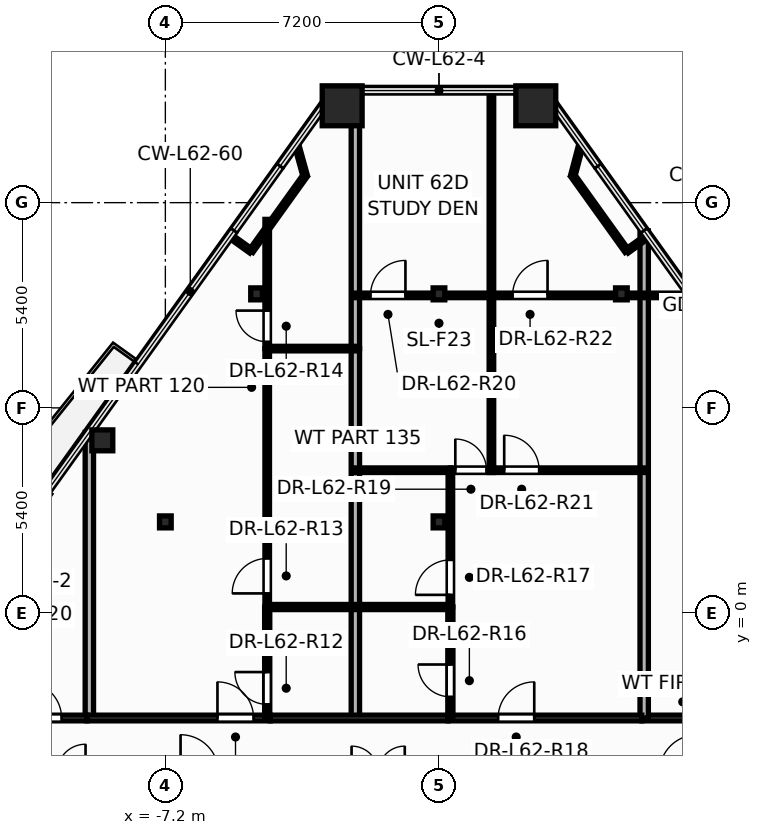
"""IFC4 building model, lengths in metres.
Left out: names, types, materials, properties, quantities, classifications, styles, units other than length and angle.
Written with IfcOpenShell. Run it as: python <this file> out.ifc"""

import sys

from ifc_helpers import new_model, si_unit, direction, frame, frame_2d, origin, origin_2d, place, context, subcontext, project, spatial, rectangle, hollow_rectangle, hollow_circle, i_section, extrude, element, fill, save


model = new_model("IFC4")
c1 = context("Model", 3, precision=1e-05, world=origin(), true_north=direction((0.0, 1.0)))
c2 = subcontext(c1, "Body", "Model", "MODEL_VIEW")
j1 = project(units=[si_unit("LENGTHUNIT", "METRE"), si_unit("PLANEANGLEUNIT", "RADIAN")], contexts=[c1])
p1 = place(None, origin())
s1 = spatial("IfcSite", under=j1, at=p1, CompositionType="ELEMENT")
p2 = place(p1, origin())
s2 = spatial("IfcBuilding", under=s1, at=p2, CompositionType="ELEMENT")
p3 = place(p2, frame((0.0, 0.0, 237.0)))
s3 = spatial("IfcBuildingStorey", under=s2, at=p3, CompositionType="ELEMENT", Elevation=237.0)
for number, where, z_axis, x_axis in (
    (1, (2.548, 13.349, 0.0), (0.0, 0.0, 1.0), (1.0, 0.0, 0.0)),
    (2, (-2.548, 13.349, 0.0), (0.0, 0.0, 1.0), (1.0, 0.0, 0.0)),
):
    element("IfcColumn", number, at=place(p3, frame(where, z_axis=z_axis, x_axis=x_axis)), inside=s3, PredefinedType="COLUMN", context=c2, shape_type="SweptSolid", body=[
        extrude(hollow_rectangle(XDim=1.05, YDim=1.05, WallThickness=0.045, at=origin_2d()), origin(), (0.0, 0.0, 1.0), 3.6),
    ])
p4 = place(p3, frame((-8.858, 4.546, 0.0), z_axis=(0.0, 0.0, 1.0), x_axis=(1.0, 0.0, 0.0)))
e3 = element("IfcColumn", 3, at=p4, inside=s3, PredefinedType="COLUMN", context=c2, shape_type="SweptSolid", body=[
    extrude(hollow_circle(Radius=0.275, WallThickness=0.024, at=origin_2d()), origin(), (0.0, 0.0, 1.0), 3.6),
])
for number, where, z_axis, x_axis in (
    (4, (-7.2, 2.4, 0.0), (0.0, 0.0, 1.0), (1.0, 0.0, 0.0)),
    (5, (0.0, 2.4, 0.0), (0.0, 0.0, 1.0), (1.0, 0.0, 0.0)),
    (6, (-4.8, 8.4, 0.0), (0.0, 0.0, 1.0), (1.0, 0.0, 0.0)),
    (7, (0.0, 8.4, 0.0), (0.0, 0.0, 1.0), (1.0, 0.0, 0.0)),
    (8, (4.8, 8.4, 0.0), (0.0, 0.0, 1.0), (1.0, 0.0, 0.0)),
):
    element("IfcColumn", number, at=place(p3, frame(where, z_axis=z_axis, x_axis=x_axis)), inside=s3, PredefinedType="COLUMN", context=c2, shape_type="SweptSolid", body=[
        extrude(i_section(OverallWidth=0.307, OverallDepth=0.314, WebThickness=0.012, FlangeThickness=0.019, at=origin_2d()), origin(), (0.0, 0.0, 1.0), 3.6),
    ])
p5 = place(p3, frame((-9.2, -2.76, 0.0), z_axis=(0.0, 0.0, 1.0), x_axis=(0.0, 1.0, 0.0)))
e9 = element("IfcWall", 9, at=p5, inside=s3, PredefinedType="PARTITIONING", context=c2, shape_type="SweptSolid", body=[
    extrude(rectangle(XDim=7.516, YDim=0.22, at=frame_2d((3.758, 0.0))), origin(), (0.0, 0.0, 1.0), 2.62),
])
p6 = place(p3, frame((5.34, -2.76, 0.0), z_axis=(0.0, 0.0, 1.0), x_axis=(1.0, 0.0, 0.0)))
e10 = element("IfcWall", 10, at=p6, inside=s3, PredefinedType="PARTITIONING", context=c2, shape_type="SweptSolid", body=[
    extrude(rectangle(XDim=7.16, YDim=0.15, at=frame_2d((3.58, 0.0))), origin(), (0.0, 0.0, 1.0), 2.32),
])
p7 = place(p6, frame((3.423, 0.0, 0.0)))
e11 = element("IfcOpeningElement", 11, at=p7, cuts=e10, PredefinedType="OPENING", context=c2, shape_type="SweptSolid", body=[
    extrude(rectangle(XDim=0.956, YDim=2.104, at=frame_2d((0.475, 1.052))), frame((0.0, 0.085, 0.0), z_axis=(0.0, -1.0, 0.0), x_axis=(1.0, 0.0, 0.0)), (0.0, 0.0, 1.0), 0.17),
])
p8 = place(p3, frame((-4.52, 0.16, 0.0), z_axis=(0.0, 0.0, 1.0), x_axis=(0.0, 1.0, 0.0)))
e12 = element("IfcWall", 12, at=p8, inside=s3, PredefinedType="PARTITIONING", context=c2, shape_type="SweptSolid", body=[
    extrude(rectangle(XDim=6.8, YDim=0.12, at=frame_2d((3.4, 0.0))), origin(), (0.0, 0.0, 1.0), 2.32),
])
p9 = place(p8, frame((0.358, 0.0, 0.0)))
e13 = element("IfcOpeningElement", 13, at=p9, cuts=e12, PredefinedType="OPENING", context=c2, shape_type="SweptSolid", body=[
    extrude(rectangle(XDim=0.926, YDim=2.104, at=frame_2d((0.46, 1.052))), frame((0.0, 0.07, 0.0), z_axis=(0.0, -1.0, 0.0), x_axis=(1.0, 0.0, 0.0)), (0.0, 0.0, 1.0), 0.14),
])
p10 = place(p3, frame((5.4, -2.76, 0.0), z_axis=(0.0, 0.0, 1.0), x_axis=(0.0, 1.0, 0.0)))
e14 = element("IfcWall", 14, at=p10, inside=s3, PredefinedType="PARTITIONING", context=c2, shape_type="SweptSolid", body=[
    extrude(rectangle(XDim=12.816, YDim=0.22, at=frame_2d((6.408, 0.0))), origin(), (0.0, 0.0, 1.0), 2.32),
])
p11 = place(p3, frame((-2.2, 6.96, 0.0), z_axis=(0.0, 0.0, 1.0), x_axis=(0.0, 1.0, 0.0)))
e15 = element("IfcWall", 15, at=p11, inside=s3, PredefinedType="PARTITIONING", context=c2, shape_type="SweptSolid", body=[
    extrude(rectangle(XDim=6.789, YDim=0.22, at=frame_2d((3.394, 0.0))), origin(), (0.0, 0.0, 1.0), 2.62),
])
p12 = place(p3, frame((1.38, 3.76, 0.0), z_axis=(0.0, 0.0, 1.0), x_axis=(0.0, 1.0, 0.0)))
e16 = element("IfcWall", 16, at=p12, inside=s3, PredefinedType="PARTITIONING", context=c2, shape_type="SweptSolid", body=[
    extrude(rectangle(XDim=9.989, YDim=0.12, at=frame_2d((4.994, 0.0))), origin(), (0.0, 0.0, 1.0), 2.62),
])
p13 = place(p3, frame((1.38, 8.36, 0.0), z_axis=(0.0, 0.0, 1.0), x_axis=(1.0, 0.0, 0.0)))
e17 = element("IfcWall", 17, at=p13, inside=s3, PredefinedType="PARTITIONING", context=c2, shape_type="SweptSolid", body=[
    extrude(rectangle(XDim=5.236, YDim=0.12, at=frame_2d((2.618, 0.0))), origin(), (0.0, 0.0, 1.0), 2.62),
])
p14 = place(p13, frame((0.557, 0.0, 0.0)))
e18 = element("IfcOpeningElement", 18, at=p14, cuts=e17, PredefinedType="OPENING", context=c2, shape_type="SweptSolid", body=[
    extrude(rectangle(XDim=0.926, YDim=2.104, at=frame_2d((0.46, 1.052))), frame((0.0, 0.07, 0.0), z_axis=(0.0, -1.0, 0.0), x_axis=(1.0, 0.0, 0.0)), (0.0, 0.0, 1.0), 0.14),
])
p15 = place(p3, frame((0.24, -2.76, 0.0), z_axis=(0.0, 0.0, 1.0), x_axis=(1.0, 0.0, 0.0)))
e19 = element("IfcWall", 19, at=p15, inside=s3, PredefinedType="PARTITIONING", context=c2, shape_type="SweptSolid", body=[
    extrude(rectangle(XDim=5.098, YDim=0.15, at=frame_2d((2.549, 0.0))), origin(), (0.0, 0.0, 1.0), 2.964),
])
p16 = place(p15, frame((1.317, 0.0, 0.0)))
e20 = element("IfcOpeningElement", 20, at=p16, cuts=e19, PredefinedType="OPENING", context=c2, shape_type="SweptSolid", body=[
    extrude(rectangle(XDim=0.956, YDim=2.104, at=frame_2d((0.475, 1.052))), frame((0.0, 0.085, 0.0), z_axis=(0.0, -1.0, 0.0), x_axis=(1.0, 0.0, 0.0)), (0.0, 0.0, 1.0), 0.17),
])
p17 = place(p3, frame((-9.26, -2.76, 0.0), z_axis=(0.0, 0.0, 1.0), x_axis=(1.0, 0.0, 0.0)))
e21 = element("IfcWall", 21, at=p17, inside=s3, PredefinedType="PARTITIONING", context=c2, shape_type="SweptSolid", body=[
    extrude(rectangle(XDim=4.82, YDim=0.15, at=frame_2d((2.41, 0.0))), origin(), (0.0, 0.0, 1.0), 2.32),
])
p18 = place(p17, frame((3.431, 0.0, 0.0)))
e22 = element("IfcOpeningElement", 22, at=p18, cuts=e21, PredefinedType="OPENING", context=c2, shape_type="SweptSolid", body=[
    extrude(rectangle(XDim=0.956, YDim=2.104, at=frame_2d((0.475, 1.052))), frame((0.0, 0.085, 0.0), z_axis=(0.0, -1.0, 0.0), x_axis=(1.0, 0.0, 0.0)), (0.0, 0.0, 1.0), 0.17),
])
p19 = place(p3, frame((1.32, 3.76, 0.0), z_axis=(0.0, 0.0, 1.0), x_axis=(1.0, 0.0, 0.0)))
e23 = element("IfcWall", 23, at=p19, inside=s3, PredefinedType="PARTITIONING", context=c2, shape_type="SweptSolid", body=[
    extrude(rectangle(XDim=4.08, YDim=0.12, at=frame_2d((2.04, 0.0))), origin(), (0.0, 0.0, 1.0), 2.964),
])
p20 = place(p19, frame((0.396, 0.0, 0.0)))
e24 = element("IfcOpeningElement", 24, at=p20, cuts=e23, PredefinedType="OPENING", context=c2, shape_type="SweptSolid", body=[
    extrude(rectangle(XDim=0.926, YDim=2.104, at=frame_2d((0.46, 1.052))), frame((0.0, 0.07, 0.0), z_axis=(0.0, -1.0, 0.0), x_axis=(1.0, 0.0, 0.0)), (0.0, 0.0, 1.0), 0.14),
])
p21 = place(p3, frame((-2.2, -2.76, 0.0), z_axis=(0.0, 0.0, 1.0), x_axis=(0.0, 1.0, 0.0)))
e25 = element("IfcWall", 25, at=p21, inside=s3, PredefinedType="PARTITIONING", context=c2, shape_type="SweptSolid", body=[
    extrude(rectangle(XDim=9.72, YDim=0.22, at=frame_2d((4.86, 0.0))), origin(), (0.0, 0.0, 1.0), 2.32),
])
p22 = place(p3, frame((0.3, 0.16, 0.0), z_axis=(0.0, 0.0, 1.0), x_axis=(0.0, 1.0, 0.0)))
e26 = element("IfcWall", 26, at=p22, inside=s3, PredefinedType="PARTITIONING", context=c2, shape_type="SweptSolid", body=[
    extrude(rectangle(XDim=3.6, YDim=0.12, at=frame_2d((1.8, 0.0))), origin(), (0.0, 0.0, 1.0), 2.32),
])
p23 = place(p22, frame((0.32, 0.0, 0.0)))
e27 = element("IfcOpeningElement", 27, at=p23, cuts=e26, PredefinedType="OPENING", context=c2, shape_type="SweptSolid", body=[
    extrude(rectangle(XDim=0.926, YDim=2.104, at=frame_2d((0.46, 1.052))), frame((0.0, 0.07, 0.0), z_axis=(0.0, -1.0, 0.0), x_axis=(1.0, 0.0, 0.0)), (0.0, 0.0, 1.0), 0.14),
])
p24 = place(p3, frame((-2.2, 8.36, 0.0), z_axis=(0.0, 0.0, 1.0), x_axis=(1.0, 0.0, 0.0)))
e28 = element("IfcWall", 28, at=p24, inside=s3, PredefinedType="PARTITIONING", context=c2, shape_type="SweptSolid", body=[
    extrude(rectangle(XDim=3.58, YDim=0.12, at=frame_2d((1.79, 0.0))), origin(), (0.0, 0.0, 1.0), 2.32),
])
p25 = place(p24, frame((0.398, 0.0, 0.0)))
e29 = element("IfcOpeningElement", 29, at=p25, cuts=e28, PredefinedType="OPENING", context=c2, shape_type="SweptSolid", body=[
    extrude(rectangle(XDim=0.926, YDim=2.104, at=frame_2d((0.46, 1.052))), frame((0.0, 0.07, 0.0), z_axis=(0.0, -1.0, 0.0), x_axis=(1.0, 0.0, 0.0)), (0.0, 0.0, 1.0), 0.14),
])
p26 = place(p3, frame((-4.52, 6.96, 0.0), z_axis=(0.0, 0.0, 1.0), x_axis=(0.0, 1.0, 0.0)))
e30 = element("IfcWall", 30, at=p26, inside=s3, PredefinedType="PARTITIONING", context=c2, shape_type="SweptSolid", body=[
    extrude(rectangle(XDim=3.4, YDim=0.12, at=frame_2d((1.7, 0.0))), origin(), (0.0, 0.0, 1.0), 2.62),
])
p27 = place(p26, frame((0.18, 0.0, 0.0)))
e31 = element("IfcOpeningElement", 31, at=p27, cuts=e30, PredefinedType="OPENING", context=c2, shape_type="SweptSolid", body=[
    extrude(rectangle(XDim=0.826, YDim=2.104, at=frame_2d((0.41, 1.052))), frame((0.0, 0.07, 0.0), z_axis=(0.0, -1.0, 0.0), x_axis=(1.0, 0.0, 0.0)), (0.0, 0.0, 1.0), 0.14),
])
p28 = place(p3, frame((-12.5, -2.76, 0.0), z_axis=(0.0, 0.0, 1.0), x_axis=(1.0, 0.0, 0.0)))
e32 = element("IfcWall", 32, at=p28, inside=s3, PredefinedType="PARTITIONING", context=c2, shape_type="SweptSolid", body=[
    extrude(rectangle(XDim=3.238, YDim=0.15, at=frame_2d((1.619, 0.0))), origin(), (0.0, 0.0, 1.0), 3.345),
])
p29 = place(p28, frame((1.619, 0.0, 0.0)))
e33 = element("IfcOpeningElement", 33, at=p29, cuts=e32, PredefinedType="OPENING", context=c2, shape_type="SweptSolid", body=[
    extrude(rectangle(XDim=0.956, YDim=2.104, at=frame_2d((0.475, 1.052))), frame((0.0, 0.085, 0.0), z_axis=(0.0, -1.0, 0.0), x_axis=(1.0, 0.0, 0.0)), (0.0, 0.0, 1.0), 0.17),
])
p30 = place(p3, frame((-4.52, -2.76, 0.0), z_axis=(0.0, 0.0, 1.0), x_axis=(0.0, 1.0, 0.0)))
e34 = element("IfcWall", 34, at=p30, inside=s3, PredefinedType="PARTITIONING", context=c2, shape_type="SweptSolid", body=[
    extrude(rectangle(XDim=2.92, YDim=0.135, at=frame_2d((1.46, 0.0))), origin(), (0.0, 0.0, 1.0), 3.345),
])
p31 = place(p30, frame((0.359, 0.0, 0.0)))
e35 = element("IfcOpeningElement", 35, at=p31, cuts=e34, PredefinedType="OPENING", context=c2, shape_type="SweptSolid", body=[
    extrude(rectangle(XDim=0.856, YDim=2.104, at=frame_2d((0.425, 1.052))), frame((0.0, 0.078, 0.0), z_axis=(0.0, -1.0, 0.0), x_axis=(1.0, 0.0, 0.0)), (0.0, 0.0, 1.0), 0.155),
])
p32 = place(p3, frame((0.3, -2.76, 0.0), z_axis=(0.0, 0.0, 1.0), x_axis=(0.0, 1.0, 0.0)))
e36 = element("IfcWall", 36, at=p32, inside=s3, PredefinedType="PARTITIONING", context=c2, shape_type="SweptSolid", body=[
    extrude(rectangle(XDim=2.92, YDim=0.135, at=frame_2d((1.46, 0.0))), origin(), (0.0, 0.0, 1.0), 2.32),
])
p33 = place(p32, frame((0.558, 0.0, 0.0)))
e37 = element("IfcOpeningElement", 37, at=p33, cuts=e36, PredefinedType="OPENING", context=c2, shape_type="SweptSolid", body=[
    extrude(rectangle(XDim=0.856, YDim=2.104, at=frame_2d((0.425, 1.052))), frame((0.0, 0.078, 0.0), z_axis=(0.0, -1.0, 0.0), x_axis=(1.0, 0.0, 0.0)), (0.0, 0.0, 1.0), 0.155),
])
p34 = place(p3, frame((-4.438, -2.76, 0.0), z_axis=(0.0, 0.0, 1.0), x_axis=(1.0, 0.0, 0.0)))
e38 = element("IfcWall", 38, at=p34, inside=s3, PredefinedType="PARTITIONING", context=c2, shape_type="SweptSolid", body=[
    extrude(rectangle(XDim=4.676, YDim=0.15, at=frame_2d((2.338, 0.0))), origin(), (0.0, 0.0, 1.0), 2.32),
])
p35 = place(p3, frame((-4.52, 0.16, 0.0), z_axis=(0.0, 0.0, 1.0), x_axis=(1.0, 0.0, 0.0)))
e39 = element("IfcWall", 39, at=p35, inside=s3, PredefinedType="PARTITIONING", context=c2, shape_type="SweptSolid", body=[
    extrude(rectangle(XDim=4.82, YDim=0.135, at=frame_2d((2.41, 0.0))), origin(), (0.0, 0.0, 1.0), 2.32),
])
p36 = place(p3, frame((-2.2, 3.76, 0.0), z_axis=(0.0, 0.0, 1.0), x_axis=(1.0, 0.0, 0.0)))
e40 = element("IfcWall", 40, at=p36, inside=s3, PredefinedType="PARTITIONING", context=c2, shape_type="SweptSolid", body=[
    extrude(rectangle(XDim=2.5, YDim=0.12, at=frame_2d((1.25, 0.0))), origin(), (0.0, 0.0, 1.0), 2.32),
])
for number, where, z_axis, x_axis in (
    (41, (-3.522, 11.509, 0.0), (0.0, 0.0, 1.0), (-0.583, -0.813, 0.0)),
    (42, (4.945, 9.525, 0.0), (0.0, 0.0, 1.0), (-0.583, 0.813, 0.0)),
):
    element("IfcWall", number, at=place(p3, frame(where, z_axis=z_axis, x_axis=x_axis)), inside=s3, PredefinedType="PARTITIONING", context=c2, shape_type="SweptSolid", body=[
        extrude(rectangle(XDim=2.441, YDim=0.12, at=frame_2d((1.221, 0.0))), origin(), (0.0, 0.0, 1.0), 2.62),
    ])
p37 = place(p3, frame((-4.52, 6.96, 0.0), z_axis=(0.0, 0.0, 1.0), x_axis=(1.0, 0.0, 0.0)))
e43 = element("IfcWall", 43, at=p37, inside=s3, PredefinedType="PARTITIONING", context=c2, shape_type="SweptSolid", body=[
    extrude(rectangle(XDim=2.32, YDim=0.12, at=frame_2d((1.16, 0.0))), origin(), (0.0, 0.0, 1.0), 2.964),
])
p38 = place(p3, frame((0.3, 3.76, 0.0), z_axis=(0.0, 0.0, 1.0), x_axis=(1.0, 0.0, 0.0)))
e44 = element("IfcWall", 44, at=p38, inside=s3, PredefinedType="PARTITIONING", context=c2, shape_type="SweptSolid", body=[
    extrude(rectangle(XDim=1.14, YDim=0.12, at=frame_2d((0.57, 0.0))), origin(), (0.0, 0.0, 1.0), 3.345),
])
p39 = place(p38, frame((0.13, 0.0, 0.0)))
e45 = element("IfcOpeningElement", 45, at=p39, cuts=e44, PredefinedType="OPENING", context=c2, shape_type="SweptSolid", body=[
    extrude(rectangle(XDim=0.826, YDim=2.104, at=frame_2d((0.41, 1.052))), frame((0.0, 0.07, 0.0), z_axis=(0.0, -1.0, 0.0), x_axis=(1.0, 0.0, 0.0)), (0.0, 0.0, 1.0), 0.14),
])
p40 = place(p3, frame((-3.752, 12.338, 0.0), z_axis=(0.0, 0.0, 1.0), x_axis=(0.267292613762, -0.963615410124, 0.0)))
e46 = element("IfcWall", 46, at=p40, inside=s3, PredefinedType="PARTITIONING", context=c2, shape_type="SweptSolid", body=[
    extrude(rectangle(XDim=0.86, YDim=0.12, at=frame_2d((0.43, 0.0))), origin(), (0.0, 0.0, 1.0), 2.62),
])
p41 = place(p3, frame((3.522, 11.509, 0.0), z_axis=(0.0, 0.0, 1.0), x_axis=(0.25459264373, 0.96704838853, 0.0)))
e47 = element("IfcWall", 47, at=p41, inside=s3, PredefinedType="PARTITIONING", context=c2, shape_type="SweptSolid", body=[
    extrude(rectangle(XDim=0.847, YDim=0.12, at=frame_2d((0.423, 0.0))), origin(), (0.0, 0.0, 1.0), 2.62),
])
for number, where, z_axis, x_axis in (
    (48, (-4.945, 9.525, 0.0), (0.0, 0.0, 1.0), (-0.813, 0.583, 0.0)),
    (49, (5.489, 9.915, 0.0), (0.0, 0.0, 1.0), (-0.813, -0.583, 0.0)),
):
    element("IfcWall", number, at=place(p3, frame(where, z_axis=z_axis, x_axis=x_axis)), inside=s3, PredefinedType="PARTITIONING", context=c2, shape_type="SweptSolid", body=[
        extrude(rectangle(XDim=0.67, YDim=0.12, at=frame_2d((0.335, 0.0))), origin(), (0.0, 0.0, 1.0), 2.863),
    ])
p42 = place(p29, origin())
e50 = element("IfcDoor", 50, at=p42, inside=s3, OperationType="SINGLE_SWING_LEFT", PredefinedType="DOOR", context=c2, shape_type="SweptSolid", body=[
    extrude(rectangle(XDim=0.95, YDim=2.1, at=frame_2d((0.475, 1.05))), frame((0.0, 0.025, 0.0), z_axis=(0.0, -1.0, 0.0), x_axis=(1.0, 0.0, 0.0)), (0.0, 0.0, 1.0), 0.05),
])
fill(e33, e50)
p43 = place(p31, origin())
e51 = element("IfcDoor", 51, at=p43, inside=s3, OperationType="SINGLE_SWING_RIGHT", PredefinedType="DOOR", context=c2, shape_type="SweptSolid", body=[
    extrude(rectangle(XDim=0.85, YDim=2.1, at=frame_2d((0.425, 1.05))), frame((0.0, 0.025, 0.0), z_axis=(0.0, -1.0, 0.0), x_axis=(1.0, 0.0, 0.0)), (0.0, 0.0, 1.0), 0.05),
])
fill(e35, e51)
p44 = place(p9, origin())
e52 = element("IfcDoor", 52, at=p44, inside=s3, OperationType="SINGLE_SWING_LEFT", PredefinedType="DOOR", context=c2, shape_type="SweptSolid", body=[
    extrude(rectangle(XDim=0.92, YDim=2.1, at=frame_2d((0.46, 1.05))), frame((0.0, 0.025, 0.0), z_axis=(0.0, -1.0, 0.0), x_axis=(1.0, 0.0, 0.0)), (0.0, 0.0, 1.0), 0.05),
])
fill(e13, e52)
p45 = place(p27, origin())
e53 = element("IfcDoor", 53, at=p45, inside=s3, OperationType="SINGLE_SWING_RIGHT", PredefinedType="DOOR", context=c2, shape_type="SweptSolid", body=[
    extrude(rectangle(XDim=0.82, YDim=2.1, at=frame_2d((0.41, 1.05))), frame((0.0, 0.025, 0.0), z_axis=(0.0, -1.0, 0.0), x_axis=(1.0, 0.0, 0.0)), (0.0, 0.0, 1.0), 0.05),
])
fill(e31, e53)
p46 = place(p18, origin())
e54 = element("IfcDoor", 54, at=p46, inside=s3, OperationType="SINGLE_SWING_LEFT", PredefinedType="DOOR", context=c2, shape_type="SweptSolid", body=[
    extrude(rectangle(XDim=0.95, YDim=2.1, at=frame_2d((0.475, 1.05))), frame((0.0, 0.025, 0.0), z_axis=(0.0, -1.0, 0.0), x_axis=(1.0, 0.0, 0.0)), (0.0, 0.0, 1.0), 0.05),
])
fill(e22, e54)
p47 = place(p33, origin())
e55 = element("IfcDoor", 55, at=p47, inside=s3, OperationType="SINGLE_SWING_RIGHT", PredefinedType="DOOR", context=c2, shape_type="SweptSolid", body=[
    extrude(rectangle(XDim=0.85, YDim=2.1, at=frame_2d((0.425, 1.05))), frame((0.0, 0.025, 0.0), z_axis=(0.0, -1.0, 0.0), x_axis=(1.0, 0.0, 0.0)), (0.0, 0.0, 1.0), 0.05),
])
fill(e37, e55)
p48 = place(p23, origin())
e56 = element("IfcDoor", 56, at=p48, inside=s3, OperationType="SINGLE_SWING_LEFT", PredefinedType="DOOR", context=c2, shape_type="SweptSolid", body=[
    extrude(rectangle(XDim=0.92, YDim=2.1, at=frame_2d((0.46, 1.05))), frame((0.0, 0.025, 0.0), z_axis=(0.0, -1.0, 0.0), x_axis=(1.0, 0.0, 0.0)), (0.0, 0.0, 1.0), 0.05),
])
fill(e27, e56)
p49 = place(p16, origin())
e57 = element("IfcDoor", 57, at=p49, inside=s3, OperationType="SINGLE_SWING_RIGHT", PredefinedType="DOOR", context=c2, shape_type="SweptSolid", body=[
    extrude(rectangle(XDim=0.95, YDim=2.1, at=frame_2d((0.475, 1.05))), frame((0.0, 0.025, 0.0), z_axis=(0.0, -1.0, 0.0), x_axis=(1.0, 0.0, 0.0)), (0.0, 0.0, 1.0), 0.05),
])
fill(e20, e57)
p50 = place(p39, origin())
e58 = element("IfcDoor", 58, at=p50, inside=s3, OperationType="SINGLE_SWING_LEFT", PredefinedType="DOOR", context=c2, shape_type="SweptSolid", body=[
    extrude(rectangle(XDim=0.82, YDim=2.1, at=frame_2d((0.41, 1.05))), frame((0.0, 0.025, 0.0), z_axis=(0.0, -1.0, 0.0), x_axis=(1.0, 0.0, 0.0)), (0.0, 0.0, 1.0), 0.05),
])
fill(e45, e58)
p51 = place(p25, origin())
e59 = element("IfcDoor", 59, at=p51, inside=s3, OperationType="SINGLE_SWING_RIGHT", PredefinedType="DOOR", context=c2, shape_type="SweptSolid", body=[
    extrude(rectangle(XDim=0.92, YDim=2.1, at=frame_2d((0.46, 1.05))), frame((0.0, 0.025, 0.0), z_axis=(0.0, -1.0, 0.0), x_axis=(1.0, 0.0, 0.0)), (0.0, 0.0, 1.0), 0.05),
])
fill(e29, e59)
p52 = place(p20, origin())
e60 = element("IfcDoor", 60, at=p52, inside=s3, OperationType="SINGLE_SWING_LEFT", PredefinedType="DOOR", context=c2, shape_type="SweptSolid", body=[
    extrude(rectangle(XDim=0.92, YDim=2.1, at=frame_2d((0.46, 1.05))), frame((0.0, 0.025, 0.0), z_axis=(0.0, -1.0, 0.0), x_axis=(1.0, 0.0, 0.0)), (0.0, 0.0, 1.0), 0.05),
])
fill(e24, e60)
p53 = place(p14, origin())
e61 = element("IfcDoor", 61, at=p53, inside=s3, OperationType="SINGLE_SWING_RIGHT", PredefinedType="DOOR", context=c2, shape_type="SweptSolid", body=[
    extrude(rectangle(XDim=0.92, YDim=2.1, at=frame_2d((0.46, 1.05))), frame((0.0, 0.025, 0.0), z_axis=(0.0, -1.0, 0.0), x_axis=(1.0, 0.0, 0.0)), (0.0, 0.0, 1.0), 0.05),
])
fill(e18, e61)
save(model, sys.argv[1])
